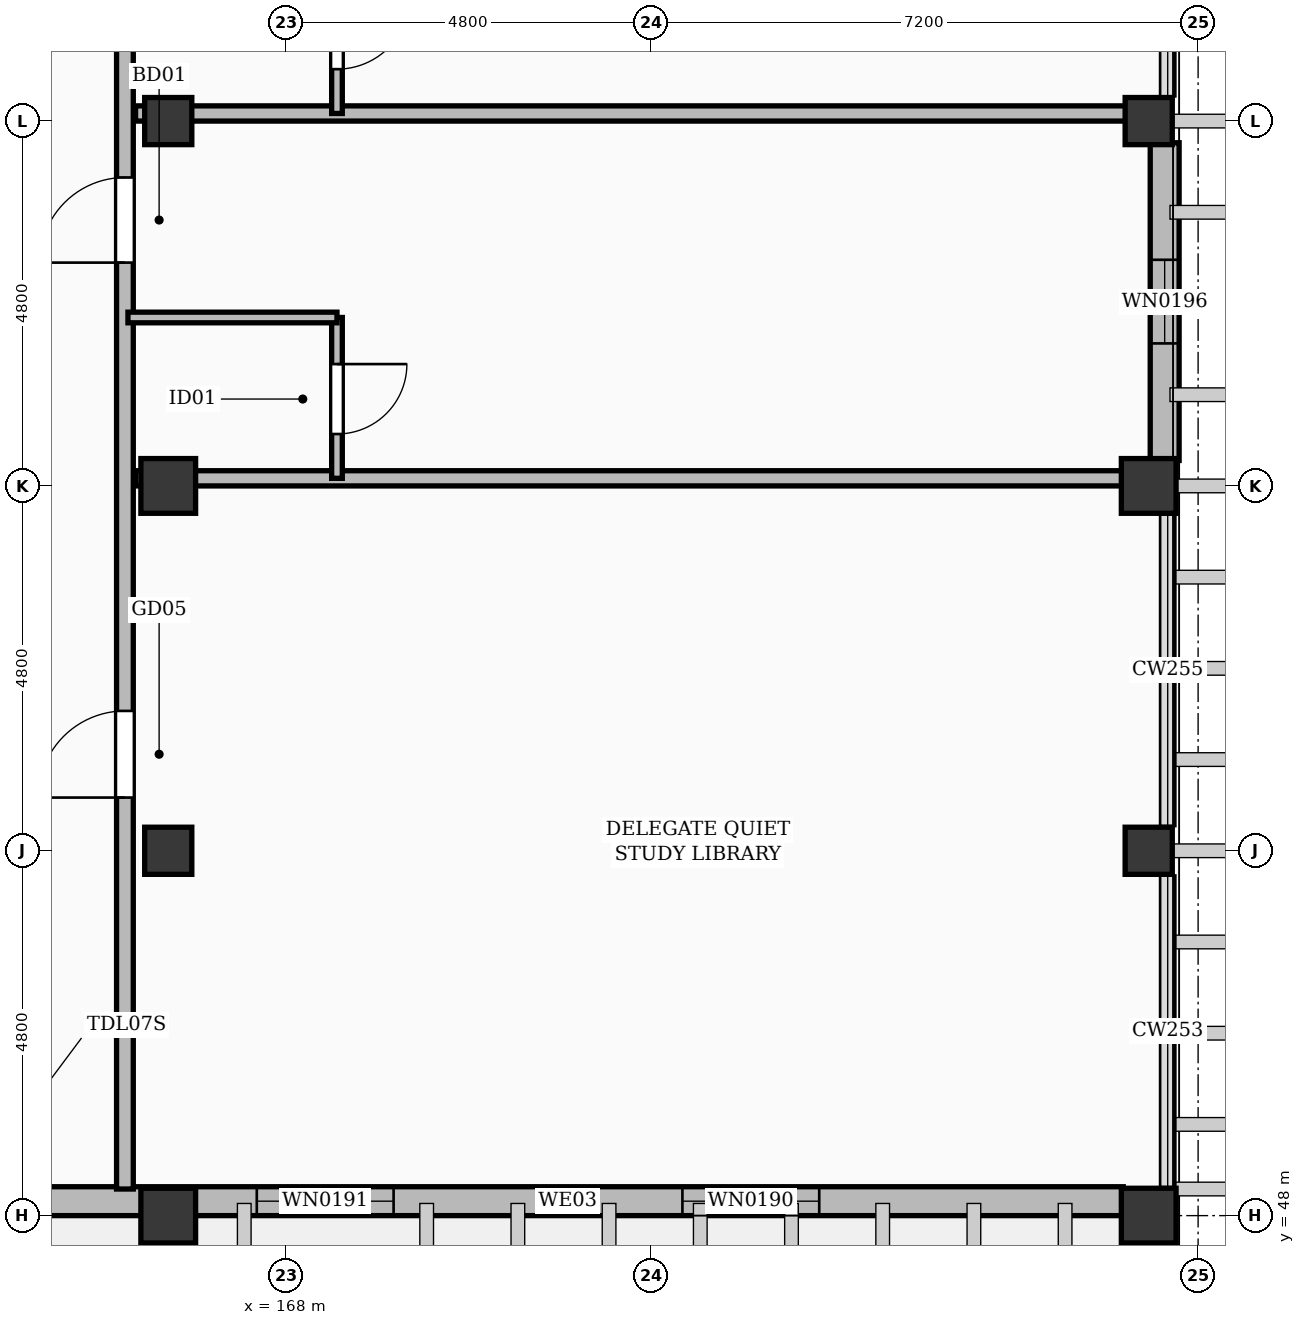
"""IFC4 building model, lengths in metres.
Left out: names, types, materials, properties, quantities, classifications, styles, units other than length and angle.
Written with IfcOpenShell. Run it as: python <this file> out.ifc"""

import sys

from ifc_helpers import new_model, si_unit, direction, frame, frame_2d, origin, origin_2d, place, context, subcontext, project, spatial, rectangle, extrude, element, fill, save


model = new_model("IFC4")
c1 = context("Model", 3, precision=1e-05, world=origin(), true_north=direction((0.0, 1.0)))
c2 = subcontext(c1, "Body", "Model", "MODEL_VIEW")
j1 = project(units=[si_unit("LENGTHUNIT", "METRE"), si_unit("PLANEANGLEUNIT", "RADIAN")], contexts=[c1])
p1 = place(None, origin())
s1 = spatial("IfcSite", under=j1, at=p1, CompositionType="ELEMENT")
p2 = place(p1, origin())
s2 = spatial("IfcBuilding", under=s1, at=p2, CompositionType="ELEMENT")
p3 = place(p2, frame((0.0, 0.0, 31.8)))
s3 = spatial("IfcBuildingStorey", under=s2, at=p3, CompositionType="ELEMENT", Elevation=31.8)
for number, where, z_axis, x_axis in (
    (1, (166.45, 48.0, 0.0), (0.0, 0.0, 1.0), (1.0, 0.0, 0.0)),
    (2, (166.45, 57.6, 0.0), (0.0, 0.0, 1.0), (1.0, 0.0, 0.0)),
    (3, (179.35, 48.0, 0.0), (0.0, 0.0, 1.0), (1.0, 0.0, 0.0)),
    (4, (179.35, 57.6, 0.0), (0.0, 0.0, 1.0), (1.0, 0.0, 0.0)),
):
    element("IfcColumn", number, at=place(p3, frame(where, z_axis=z_axis, x_axis=x_axis)), inside=s3, PredefinedType="COLUMN", context=c2, shape_type="SweptSolid", body=[
        extrude(rectangle(XDim=0.72, YDim=0.72, at=origin_2d()), origin(), (0.0, 0.0, 1.0), 3.6),
    ])
for number, where, z_axis, x_axis in (
    (5, (166.45, 52.8, 0.0), (0.0, 0.0, 1.0), (1.0, 0.0, 0.0)),
    (6, (166.45, 62.4, 0.0), (0.0, 0.0, 1.0), (1.0, 0.0, 0.0)),
    (7, (179.35, 52.8, 0.0), (0.0, 0.0, 1.0), (1.0, 0.0, 0.0)),
    (8, (179.35, 62.4, 0.0), (0.0, 0.0, 1.0), (1.0, 0.0, 0.0)),
):
    element("IfcColumn", number, at=place(p3, frame(where, z_axis=z_axis, x_axis=x_axis)), inside=s3, PredefinedType="COLUMN", context=c2, shape_type="SweptSolid", body=[
        extrude(rectangle(XDim=0.62, YDim=0.62, at=origin_2d()), origin(), (0.0, 0.0, 1.0), 3.6),
    ])
p4 = place(p3, frame((179.015, 48.19, 0.0), z_axis=(0.0, 0.0, 1.0), x_axis=(-1.0, 0.0, 0.0)))
e9 = element("IfcWall", 9, at=p4, inside=s3, PredefinedType="SOLIDWALL", context=c2, shape_type="SweptSolid", body=[
    extrude(rectangle(XDim=29.23, YDim=0.38, at=frame_2d((14.615, 0.0))), origin(), (0.0, 0.0, 1.0), 2.602),
])
p5 = place(p4, frame((14.15, 0.0, 0.0)))
e10 = element("IfcOpeningElement", 10, at=p5, cuts=e9, PredefinedType="OPENING", context=c2, shape_type="SweptSolid", body=[
    extrude(rectangle(XDim=1.6, YDim=2.25, at=frame_2d((0.8, 1.125))), frame((0.0, 0.202, 0.0), z_axis=(0.0, -1.0, 0.0), x_axis=(1.0, 0.0, 0.0)), (0.0, 0.0, 1.0), 0.404),
])
p6 = place(p4, frame((4.0, 0.0, 0.55)))
e11 = element("IfcOpeningElement", 11, at=p6, cuts=e9, PredefinedType="OPENING", context=c2, shape_type="SweptSolid", body=[
    extrude(rectangle(XDim=1.8, YDim=1.76, at=frame_2d((0.9, 0.88))), frame((0.0, 0.202, 0.0), z_axis=(0.0, -1.0, 0.0), x_axis=(1.0, 0.0, 0.0)), (0.0, 0.0, 1.0), 0.404),
])
p7 = place(p4, frame((9.6, 0.0, 0.55)))
e12 = element("IfcOpeningElement", 12, at=p7, cuts=e9, PredefinedType="OPENING", context=c2, shape_type="SweptSolid", body=[
    extrude(rectangle(XDim=1.8, YDim=1.76, at=frame_2d((0.9, 0.88))), frame((0.0, 0.202, 0.0), z_axis=(0.0, -1.0, 0.0), x_axis=(1.0, 0.0, 0.0)), (0.0, 0.0, 1.0), 0.404),
])
p8 = place(p4, frame((20.8, 0.0, 0.55)))
e13 = element("IfcOpeningElement", 13, at=p8, cuts=e9, PredefinedType="OPENING", context=c2, shape_type="SweptSolid", body=[
    extrude(rectangle(XDim=1.8, YDim=1.76, at=frame_2d((0.9, 0.88))), frame((0.0, 0.202, 0.0), z_axis=(0.0, -1.0, 0.0), x_axis=(1.0, 0.0, 0.0)), (0.0, 0.0, 1.0), 0.404),
])
p9 = place(p4, frame((25.4, 0.0, 0.55)))
e14 = element("IfcOpeningElement", 14, at=p9, cuts=e9, PredefinedType="OPENING", context=c2, shape_type="SweptSolid", body=[
    extrude(rectangle(XDim=1.8, YDim=1.76, at=frame_2d((0.9, 0.88))), frame((0.0, 0.202, 0.0), z_axis=(0.0, -1.0, 0.0), x_axis=(1.0, 0.0, 0.0)), (0.0, 0.0, 1.0), 0.404),
])
p10 = place(p3, frame((179.56, 62.115, 0.0), z_axis=(0.0, 0.0, 1.0), x_axis=(0.0, -1.0, 0.0)))
e15 = element("IfcWall", 15, at=p10, inside=s3, PredefinedType="SOLIDWALL", context=c2, shape_type="SweptSolid", body=[
    extrude(rectangle(XDim=4.18, YDim=0.38, at=frame_2d((2.09, 0.0))), origin(), (0.0, 0.0, 1.0), 2.602),
])
p11 = place(p10, frame((1.54, 0.0, 0.55)))
e16 = element("IfcOpeningElement", 16, at=p11, cuts=e15, PredefinedType="OPENING", context=c2, shape_type="SweptSolid", body=[
    extrude(rectangle(XDim=1.1, YDim=1.7, at=frame_2d((0.55, 0.85))), frame((0.0, 0.202, 0.0), z_axis=(0.0, -1.0, 0.0), x_axis=(1.0, 0.0, 0.0)), (0.0, 0.0, 1.0), 0.404),
])
p12 = place(p3, frame((165.88, 48.35, 0.0), z_axis=(0.0, 0.0, 1.0), x_axis=(0.0, 1.0, 0.0)))
e17 = element("IfcWall", 17, at=p12, inside=s3, PredefinedType="PARTITIONING", context=c2, shape_type="SweptSolid", body=[
    extrude(rectangle(XDim=77.3, YDim=0.22, at=frame_2d((38.65, 0.0))), origin(), (0.0, 0.0, 1.0), 2.602),
])
p13 = place(p12, frame((5.15, 0.0, 0.0)))
e18 = element("IfcOpeningElement", 18, at=p13, cuts=e17, PredefinedType="OPENING", context=c2, shape_type="SweptSolid", body=[
    extrude(rectangle(XDim=1.14, YDim=2.26, at=frame_2d((0.57, 1.13))), frame((0.0, 0.122, 0.0), z_axis=(0.0, -1.0, 0.0), x_axis=(1.0, 0.0, 0.0)), (0.0, 0.0, 1.0), 0.244),
])
p14 = place(p12, frame((12.188, 0.0, 0.0)))
e19 = element("IfcOpeningElement", 19, at=p14, cuts=e17, PredefinedType="OPENING", context=c2, shape_type="SweptSolid", body=[
    extrude(rectangle(XDim=1.12, YDim=2.15, at=frame_2d((0.56, 1.075))), frame((0.0, 0.122, 0.0), z_axis=(0.0, -1.0, 0.0), x_axis=(1.0, 0.0, 0.0)), (0.0, 0.0, 1.0), 0.244),
])
p15 = place(p12, frame((16.988, 0.0, 0.0)))
e20 = element("IfcOpeningElement", 20, at=p15, cuts=e17, PredefinedType="OPENING", context=c2, shape_type="SweptSolid", body=[
    extrude(rectangle(XDim=1.28, YDim=2.16, at=frame_2d((0.64, 1.08))), frame((0.0, 0.122, 0.0), z_axis=(0.0, -1.0, 0.0), x_axis=(1.0, 0.0, 0.0)), (0.0, 0.0, 1.0), 0.244),
])
p16 = place(p12, frame((21.788, 0.0, 0.0)))
e21 = element("IfcOpeningElement", 21, at=p16, cuts=e17, PredefinedType="OPENING", context=c2, shape_type="SweptSolid", body=[
    extrude(rectangle(XDim=1.05, YDim=2.18, at=frame_2d((0.525, 1.09))), frame((0.0, 0.122, 0.0), z_axis=(0.0, -1.0, 0.0), x_axis=(1.0, 0.0, 0.0)), (0.0, 0.0, 1.0), 0.244),
])
p17 = place(p12, frame((26.588, 0.0, 0.0)))
e22 = element("IfcOpeningElement", 22, at=p17, cuts=e17, PredefinedType="OPENING", context=c2, shape_type="SweptSolid", body=[
    extrude(rectangle(XDim=1.08, YDim=2.25, at=frame_2d((0.54, 1.125))), frame((0.0, 0.122, 0.0), z_axis=(0.0, -1.0, 0.0), x_axis=(1.0, 0.0, 0.0)), (0.0, 0.0, 1.0), 0.244),
])
p18 = place(p12, frame((31.388, 0.0, 0.0)))
e23 = element("IfcOpeningElement", 23, at=p18, cuts=e17, PredefinedType="OPENING", context=c2, shape_type="SweptSolid", body=[
    extrude(rectangle(XDim=1.02, YDim=2.2, at=frame_2d((0.51, 1.1))), frame((0.0, 0.122, 0.0), z_axis=(0.0, -1.0, 0.0), x_axis=(1.0, 0.0, 0.0)), (0.0, 0.0, 1.0), 0.244),
])
p19 = place(p12, frame((35.838, 0.0, 0.0)))
e24 = element("IfcOpeningElement", 24, at=p19, cuts=e17, PredefinedType="OPENING", context=c2, shape_type="SweptSolid", body=[
    extrude(rectangle(XDim=1.5, YDim=2.3, at=frame_2d((0.75, 1.15))), frame((0.0, 0.122, 0.0), z_axis=(0.0, -1.0, 0.0), x_axis=(1.0, 0.0, 0.0)), (0.0, 0.0, 1.0), 0.244),
])
p20 = place(p12, frame((40.988, 0.0, 0.0)))
e25 = element("IfcOpeningElement", 25, at=p20, cuts=e17, PredefinedType="OPENING", context=c2, shape_type="SweptSolid", body=[
    extrude(rectangle(XDim=1.12, YDim=2.15, at=frame_2d((0.56, 1.075))), frame((0.0, 0.122, 0.0), z_axis=(0.0, -1.0, 0.0), x_axis=(1.0, 0.0, 0.0)), (0.0, 0.0, 1.0), 0.244),
])
p21 = place(p12, frame((45.788, 0.0, 0.0)))
e26 = element("IfcOpeningElement", 26, at=p21, cuts=e17, PredefinedType="OPENING", context=c2, shape_type="SweptSolid", body=[
    extrude(rectangle(XDim=1.28, YDim=2.16, at=frame_2d((0.64, 1.08))), frame((0.0, 0.122, 0.0), z_axis=(0.0, -1.0, 0.0), x_axis=(1.0, 0.0, 0.0)), (0.0, 0.0, 1.0), 0.244),
])
p22 = place(p12, frame((50.588, 0.0, 0.0)))
e27 = element("IfcOpeningElement", 27, at=p22, cuts=e17, PredefinedType="OPENING", context=c2, shape_type="SweptSolid", body=[
    extrude(rectangle(XDim=1.05, YDim=2.18, at=frame_2d((0.525, 1.09))), frame((0.0, 0.122, 0.0), z_axis=(0.0, -1.0, 0.0), x_axis=(1.0, 0.0, 0.0)), (0.0, 0.0, 1.0), 0.244),
])
p23 = place(p12, frame((55.388, 0.0, 0.0)))
e28 = element("IfcOpeningElement", 28, at=p23, cuts=e17, PredefinedType="OPENING", context=c2, shape_type="SweptSolid", body=[
    extrude(rectangle(XDim=1.08, YDim=2.25, at=frame_2d((0.54, 1.125))), frame((0.0, 0.122, 0.0), z_axis=(0.0, -1.0, 0.0), x_axis=(1.0, 0.0, 0.0)), (0.0, 0.0, 1.0), 0.244),
])
p24 = place(p12, frame((60.188, 0.0, 0.0)))
e29 = element("IfcOpeningElement", 29, at=p24, cuts=e17, PredefinedType="OPENING", context=c2, shape_type="SweptSolid", body=[
    extrude(rectangle(XDim=1.02, YDim=2.2, at=frame_2d((0.51, 1.1))), frame((0.0, 0.122, 0.0), z_axis=(0.0, -1.0, 0.0), x_axis=(1.0, 0.0, 0.0)), (0.0, 0.0, 1.0), 0.244),
])
p25 = place(p12, frame((64.638, 0.0, 0.0)))
e30 = element("IfcOpeningElement", 30, at=p25, cuts=e17, PredefinedType="OPENING", context=c2, shape_type="SweptSolid", body=[
    extrude(rectangle(XDim=1.5, YDim=2.3, at=frame_2d((0.75, 1.15))), frame((0.0, 0.122, 0.0), z_axis=(0.0, -1.0, 0.0), x_axis=(1.0, 0.0, 0.0)), (0.0, 0.0, 1.0), 0.244),
])
p26 = place(p12, frame((69.788, 0.0, 0.0)))
e31 = element("IfcOpeningElement", 31, at=p26, cuts=e17, PredefinedType="OPENING", context=c2, shape_type="SweptSolid", body=[
    extrude(rectangle(XDim=1.12, YDim=2.15, at=frame_2d((0.56, 1.075))), frame((0.0, 0.122, 0.0), z_axis=(0.0, -1.0, 0.0), x_axis=(1.0, 0.0, 0.0)), (0.0, 0.0, 1.0), 0.244),
])
p27 = place(p12, frame((74.588, 0.0, 0.0)))
e32 = element("IfcOpeningElement", 32, at=p27, cuts=e17, PredefinedType="OPENING", context=c2, shape_type="SweptSolid", body=[
    extrude(rectangle(XDim=1.28, YDim=2.16, at=frame_2d((0.64, 1.08))), frame((0.0, 0.122, 0.0), z_axis=(0.0, -1.0, 0.0), x_axis=(1.0, 0.0, 0.0)), (0.0, 0.0, 1.0), 0.244),
])
p28 = place(p3, frame((166.02, 57.7, 0.0), z_axis=(0.0, 0.0, 1.0), x_axis=(1.0, 0.0, 0.0)))
e33 = element("IfcWall", 33, at=p28, inside=s3, PredefinedType="PARTITIONING", context=c2, shape_type="SweptSolid", body=[
    extrude(rectangle(XDim=13.23, YDim=0.2, at=frame_2d((6.615, 0.0))), origin(), (0.0, 0.0, 1.0), 2.602),
])
p29 = place(p3, frame((168.67, 57.7, 0.0), z_axis=(0.0, 0.0, 1.0), x_axis=(0.0, 1.0, 0.0)))
e34 = element("IfcWall", 34, at=p29, inside=s3, PredefinedType="PARTITIONING", context=c2, shape_type="SweptSolid", body=[
    extrude(rectangle(XDim=2.116, YDim=0.14, at=frame_2d((1.058, 0.0))), origin(), (0.0, 0.0, 1.0), 2.732),
])
p30 = place(p29, frame((0.583, 0.0, 0.0)))
e35 = element("IfcOpeningElement", 35, at=p30, cuts=e34, PredefinedType="OPENING", context=c2, shape_type="SweptSolid", body=[
    extrude(rectangle(XDim=0.92, YDim=2.1, at=frame_2d((0.46, 1.05))), frame((0.0, 0.082, 0.0), z_axis=(0.0, -1.0, 0.0), x_axis=(1.0, 0.0, 0.0)), (0.0, 0.0, 1.0), 0.164),
])
p31 = place(p3, frame((165.92, 59.816, 0.0), z_axis=(0.0, 0.0, 1.0), x_axis=(1.0, 0.0, 0.0)))
e36 = element("IfcWall", 36, at=p31, inside=s3, PredefinedType="PARTITIONING", context=c2, shape_type="SweptSolid", body=[
    extrude(rectangle(XDim=2.75, YDim=0.14, at=frame_2d((1.375, 0.0))), origin(), (0.0, 0.0, 1.0), 2.732),
])
p32 = place(p3, frame((166.02, 62.5, 0.0), z_axis=(0.0, 0.0, 1.0), x_axis=(1.0, 0.0, 0.0)))
e37 = element("IfcWall", 37, at=p32, inside=s3, PredefinedType="PARTITIONING", context=c2, shape_type="SweptSolid", body=[
    extrude(rectangle(XDim=13.23, YDim=0.2, at=frame_2d((6.615, 0.0))), origin(), (0.0, 0.0, 1.0), 2.602),
])
p33 = place(p3, frame((168.67, 62.5, 0.0), z_axis=(0.0, 0.0, 1.0), x_axis=(0.0, 1.0, 0.0)))
e38 = element("IfcWall", 38, at=p33, inside=s3, PredefinedType="PARTITIONING", context=c2, shape_type="SweptSolid", body=[
    extrude(rectangle(XDim=2.116, YDim=0.14, at=frame_2d((1.058, 0.0))), origin(), (0.0, 0.0, 1.0), 2.732),
])
p34 = place(p33, frame((0.583, 0.0, 0.0)))
e39 = element("IfcOpeningElement", 39, at=p34, cuts=e38, PredefinedType="OPENING", context=c2, shape_type="SweptSolid", body=[
    extrude(rectangle(XDim=0.96, YDim=2.12, at=frame_2d((0.48, 1.06))), frame((0.0, 0.082, 0.0), z_axis=(0.0, -1.0, 0.0), x_axis=(1.0, 0.0, 0.0)), (0.0, 0.0, 1.0), 0.164),
])
p35 = place(p6, origin())
e40 = element("IfcWindow", 40, at=p35, inside=s3, PartitioningType="SINGLE_PANEL", PredefinedType="WINDOW", context=c2, shape_type="SweptSolid", body=[
    extrude(rectangle(XDim=1.8, YDim=1.76, at=frame_2d((0.9, 0.88))), frame((0.0, 0.03, 0.0), z_axis=(0.0, -1.0, 0.0), x_axis=(1.0, 0.0, 0.0)), (0.0, 0.0, 1.0), 0.06),
])
fill(e11, e40)
p36 = place(p7, origin())
e41 = element("IfcWindow", 41, at=p36, inside=s3, PartitioningType="SINGLE_PANEL", PredefinedType="WINDOW", context=c2, shape_type="SweptSolid", body=[
    extrude(rectangle(XDim=1.8, YDim=1.76, at=frame_2d((0.9, 0.88))), frame((0.0, 0.03, 0.0), z_axis=(0.0, -1.0, 0.0), x_axis=(1.0, 0.0, 0.0)), (0.0, 0.0, 1.0), 0.06),
])
fill(e12, e41)
p37 = place(p11, origin())
e42 = element("IfcWindow", 42, at=p37, inside=s3, PartitioningType="SINGLE_PANEL", PredefinedType="WINDOW", context=c2, shape_type="SweptSolid", body=[
    extrude(rectangle(XDim=1.1, YDim=1.7, at=frame_2d((0.55, 0.85))), frame((0.0, 0.03, 0.0), z_axis=(0.0, -1.0, 0.0), x_axis=(1.0, 0.0, 0.0)), (0.0, 0.0, 1.0), 0.06),
])
fill(e16, e42)
p38 = place(p13, origin())
e43 = element("IfcDoor", 43, at=p38, inside=s3, OperationType="SINGLE_SWING_LEFT", PredefinedType="DOOR", context=c2, shape_type="SweptSolid", body=[
    extrude(rectangle(XDim=1.14, YDim=2.26, at=frame_2d((0.57, 1.13))), frame((0.0, 0.025, 0.0), z_axis=(0.0, -1.0, 0.0), x_axis=(1.0, 0.0, 0.0)), (0.0, 0.0, 1.0), 0.05),
])
fill(e18, e43)
p39 = place(p14, origin())
e44 = element("IfcDoor", 44, at=p39, inside=s3, OperationType="SINGLE_SWING_LEFT", PredefinedType="DOOR", context=c2, shape_type="SweptSolid", body=[
    extrude(rectangle(XDim=1.12, YDim=2.15, at=frame_2d((0.56, 1.075))), frame((0.0, 0.025, 0.0), z_axis=(0.0, -1.0, 0.0), x_axis=(1.0, 0.0, 0.0)), (0.0, 0.0, 1.0), 0.05),
])
fill(e19, e44)
p40 = place(p30, frame((0.92, 0.0, 0.0), z_axis=(0.0, 0.0, 1.0), x_axis=(-1.0, 0.0, 0.0)))
e45 = element("IfcDoor", 45, at=p40, inside=s3, OperationType="SINGLE_SWING_RIGHT", PredefinedType="DOOR", context=c2, shape_type="SweptSolid", body=[
    extrude(rectangle(XDim=0.92, YDim=2.1, at=frame_2d((0.46, 1.05))), frame((0.0, 0.025, 0.0), z_axis=(0.0, -1.0, 0.0), x_axis=(1.0, 0.0, 0.0)), (0.0, 0.0, 1.0), 0.05),
])
fill(e35, e45)
p41 = place(p34, frame((0.96, 0.0, 0.0), z_axis=(0.0, 0.0, 1.0), x_axis=(-1.0, 0.0, 0.0)))
e46 = element("IfcDoor", 46, at=p41, inside=s3, OperationType="SINGLE_SWING_RIGHT", PredefinedType="DOOR", context=c2, shape_type="SweptSolid", body=[
    extrude(rectangle(XDim=0.96, YDim=2.12, at=frame_2d((0.48, 1.06))), frame((0.0, 0.025, 0.0), z_axis=(0.0, -1.0, 0.0), x_axis=(1.0, 0.0, 0.0)), (0.0, 0.0, 1.0), 0.05),
])
fill(e39, e46)
save(model, sys.argv[1])
